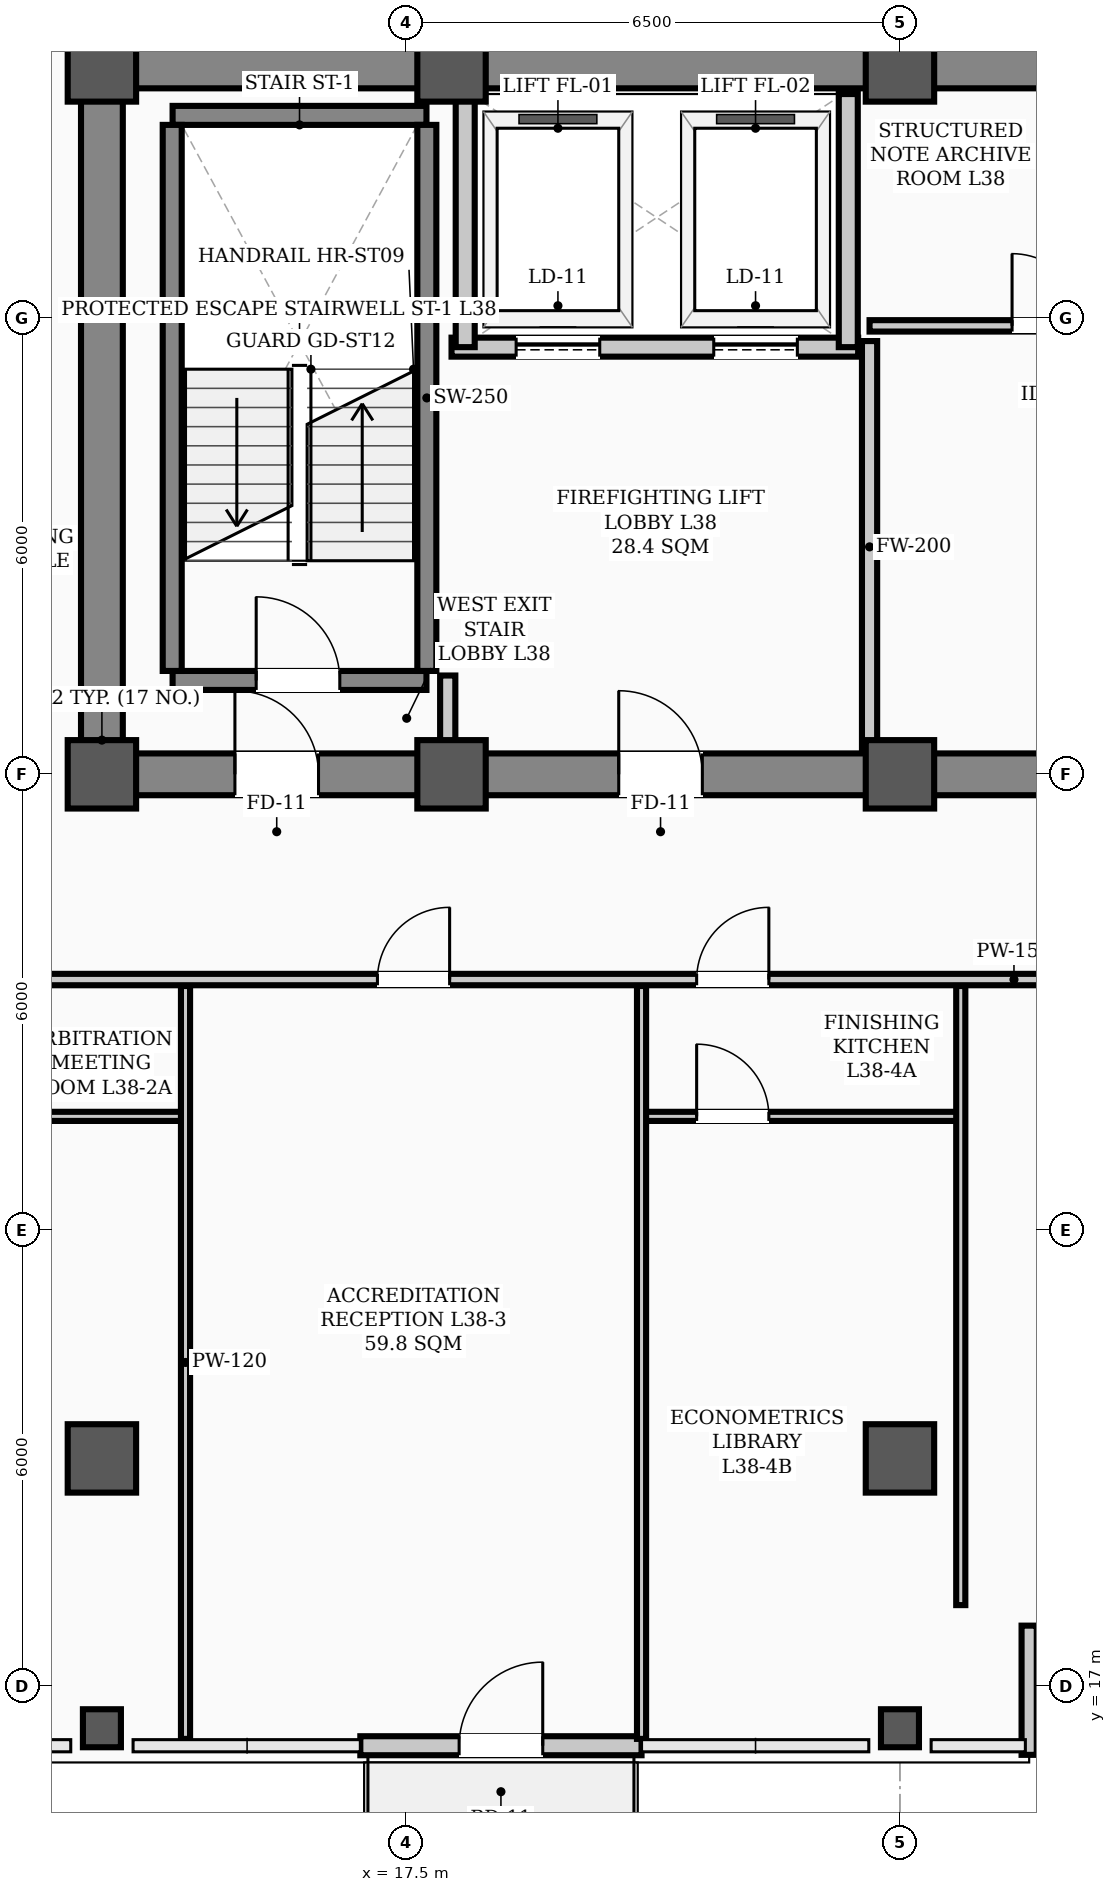
"""IFC4 building model, lengths in metres.
Left out: names, types, materials, properties, quantities, classifications, styles, units other than length and angle.
Written with IfcOpenShell. Run it as: python <this file> out.ifc"""

import sys

from ifc_helpers import new_model, si_unit, direction, frame, frame_2d, origin, origin_2d, place, context, subcontext, project, spatial, rectangle, hollow_rectangle, extrude, element, fill, save


model = new_model("IFC4")
c1 = context("Model", 3, precision=1e-05, world=origin(), true_north=direction((0.0, 1.0)))
c2 = subcontext(c1, "Body", "Model", "MODEL_VIEW")
j1 = project(units=[si_unit("LENGTHUNIT", "METRE"), si_unit("PLANEANGLEUNIT", "RADIAN")], contexts=[c1])
p1 = place(None, origin())
s1 = spatial("IfcSite", under=j1, at=p1, CompositionType="ELEMENT")
p2 = place(p1, origin())
s2 = spatial("IfcBuilding", under=s1, at=p2, CompositionType="ELEMENT")
p3 = place(p2, frame((0.0, 0.0, 153.9)))
s3 = spatial("IfcBuildingStorey", under=s2, at=p3, CompositionType="ELEMENT", Elevation=153.9)
for number, where, z_axis, x_axis in (
    (1, (13.5, 29.0, 0.0), (0.0, 0.0, 1.0), (1.0, 0.0, 0.0)),
    (2, (13.5, 38.3, 0.0), (0.0, 0.0, 1.0), (1.0, 0.0, 0.0)),
    (3, (18.1, 29.0, 0.0), (0.0, 0.0, 1.0), (1.0, 0.0, 0.0)),
    (4, (18.1, 38.3, 0.0), (0.0, 0.0, 1.0), (1.0, 0.0, 0.0)),
    (5, (24.0, 29.0, 0.0), (0.0, 0.0, 1.0), (1.0, 0.0, 0.0)),
    (6, (24.0, 38.3, 0.0), (0.0, 0.0, 1.0), (1.0, 0.0, 0.0)),
    (7, (13.5, 20.0, 0.0), (0.0, 0.0, 1.0), (1.0, 0.0, 0.0)),
    (8, (24.0, 20.0, 0.0), (0.0, 0.0, 1.0), (1.0, 0.0, 0.0)),
):
    element("IfcColumn", number, at=place(p3, frame(where, z_axis=z_axis, x_axis=x_axis)), inside=s3, PredefinedType="COLUMN", context=c2, shape_type="SweptSolid", body=[
        extrude(hollow_rectangle(XDim=0.9, YDim=0.9, WallThickness=0.035, InnerFilletRadius=0.017, OuterFilletRadius=0.052, at=origin_2d()), origin(), (0.0, 0.0, 1.0), 3.9),
    ])
for number, where, z_axis, x_axis in (
    (9, (13.5, 16.45, 0.0), (0.0, 0.0, 1.0), (1.0, 0.0, 0.0)),
    (10, (24.0, 16.45, 0.0), (0.0, 0.0, 1.0), (1.0, 0.0, 0.0)),
):
    element("IfcColumn", number, at=place(p3, frame(where, z_axis=z_axis, x_axis=x_axis)), inside=s3, PredefinedType="COLUMN", context=c2, shape_type="SweptSolid", body=[
        extrude(hollow_rectangle(XDim=0.5, YDim=0.5, WallThickness=0.024, InnerFilletRadius=0.012, OuterFilletRadius=0.036, at=origin_2d()), origin(), (0.0, 0.0, 1.0), 3.9),
    ])
p4 = place(p3, frame((25.7, 16.1, 0.0), z_axis=(0.0, 0.0, 1.0), x_axis=(0.0, 1.0, 0.0)))
e11 = element("IfcWall", 11, at=p4, inside=s3, PredefinedType="PARAPET", context=c2, shape_type="SweptSolid", body=[
    extrude(rectangle(XDim=1.7, YDim=0.2, at=frame_2d((0.85, 0.0))), origin(), (0.0, 0.0, 1.0), 1.2),
])
p5 = place(p3, frame((16.9, 16.22, 0.0), z_axis=(0.0, 0.0, 1.0), x_axis=(1.0, 0.0, 0.0)))
e12 = element("IfcWall", 12, at=p5, inside=s3, PredefinedType="STANDARD", context=c2, shape_type="SweptSolid", body=[
    extrude(rectangle(XDim=3.7, YDim=0.25, at=frame_2d((1.85, 0.0))), origin(), (0.0, 0.0, 1.0), 3.18),
])
p6 = place(p5, frame((1.3, 0.0, 0.0)))
e13 = element("IfcOpeningElement", 13, at=p6, cuts=e12, PredefinedType="OPENING", context=c2, shape_type="SweptSolid", body=[
    extrude(rectangle(XDim=1.1, YDim=2.2, at=frame_2d((0.55, 1.1))), frame((0.0, 0.135, 0.0), z_axis=(0.0, -1.0, 0.0), x_axis=(1.0, 0.0, 0.0)), (0.0, 0.0, 1.0), 0.27),
])
p7 = place(p3, frame((13.5, 29.0, 0.0), z_axis=(0.0, 0.0, 1.0), x_axis=(1.0, 0.0, 0.0)))
e14 = element("IfcWall", 14, at=p7, inside=s3, PredefinedType="SHEAR", context=c2, shape_type="SweptSolid", body=[
    extrude(rectangle(XDim=30.5, YDim=0.55, at=frame_2d((15.25, 0.0))), origin(), (0.0, 0.0, 1.0), 3.72),
])
p8 = place(p7, frame((1.75, 0.0, 0.0)))
e15 = element("IfcOpeningElement", 15, at=p8, cuts=e14, PredefinedType="OPENING", context=c2, shape_type="SweptSolid", body=[
    extrude(rectangle(XDim=1.1, YDim=2.08, at=frame_2d((0.55, 1.04))), frame((0.0, 0.285, 0.0), z_axis=(0.0, -1.0, 0.0), x_axis=(1.0, 0.0, 0.0)), (0.0, 0.0, 1.0), 0.57),
])
p9 = place(p7, frame((26.7, 0.0, 0.0)))
e16 = element("IfcOpeningElement", 16, at=p9, cuts=e14, PredefinedType="OPENING", context=c2, shape_type="SweptSolid", body=[
    extrude(rectangle(XDim=1.1, YDim=2.08, at=frame_2d((0.55, 1.04))), frame((0.0, 0.285, 0.0), z_axis=(0.0, -1.0, 0.0), x_axis=(1.0, 0.0, 0.0)), (0.0, 0.0, 1.0), 0.57),
])
p10 = place(p7, frame((6.8, 0.0, 0.0)))
e17 = element("IfcOpeningElement", 17, at=p10, cuts=e14, PredefinedType="OPENING", context=c2, shape_type="SweptSolid", body=[
    extrude(rectangle(XDim=1.1, YDim=2.08, at=frame_2d((0.55, 1.04))), frame((0.0, 0.285, 0.0), z_axis=(0.0, -1.0, 0.0), x_axis=(1.0, 0.0, 0.0)), (0.0, 0.0, 1.0), 0.57),
])
p11 = place(p7, frame((13.2, 0.0, 0.0)))
e18 = element("IfcOpeningElement", 18, at=p11, cuts=e14, PredefinedType="OPENING", context=c2, shape_type="SweptSolid", body=[
    extrude(rectangle(XDim=1.6, YDim=2.08, at=frame_2d((0.8, 1.04))), frame((0.0, 0.285, 0.0), z_axis=(0.0, -1.0, 0.0), x_axis=(1.0, 0.0, 0.0)), (0.0, 0.0, 1.0), 0.57),
])
p12 = place(p7, frame((20.525, 0.0, 0.0)))
e19 = element("IfcOpeningElement", 19, at=p12, cuts=e14, PredefinedType="OPENING", context=c2, shape_type="SweptSolid", body=[
    extrude(rectangle(XDim=0.95, YDim=2.08, at=frame_2d((0.475, 1.04))), frame((0.0, 0.285, 0.0), z_axis=(0.0, -1.0, 0.0), x_axis=(1.0, 0.0, 0.0)), (0.0, 0.0, 1.0), 0.57),
])
p13 = place(p3, frame((13.5, 38.3, 0.0), z_axis=(0.0, 0.0, 1.0), x_axis=(1.0, 0.0, 0.0)))
e20 = element("IfcWall", 20, at=p13, inside=s3, PredefinedType="SHEAR", context=c2, shape_type="SweptSolid", body=[
    extrude(rectangle(XDim=30.5, YDim=0.55, at=frame_2d((15.25, 0.0))), origin(), (0.0, 0.0, 1.0), 3.72),
])
p14 = place(p3, frame((13.5, 29.35, 0.0), z_axis=(0.0, 0.0, 1.0), x_axis=(0.0, 1.0, 0.0)))
e21 = element("IfcWall", 21, at=p14, inside=s3, PredefinedType="SHEAR", context=c2, shape_type="SweptSolid", body=[
    extrude(rectangle(XDim=8.6, YDim=0.55, at=frame_2d((4.3, 0.0))), origin(), (0.0, 0.0, 1.0), 3.72),
])
p15 = place(p3, frame((14.43, 30.235, 0.0), z_axis=(0.0, 0.0, 1.0), x_axis=(1.0, 0.0, 0.0)))
e22 = element("IfcWall", 22, at=p15, inside=s3, PredefinedType="STANDARD", context=c2, shape_type="SweptSolid", body=[
    extrude(rectangle(XDim=3.34, YDim=0.25, at=frame_2d((1.67, 0.0))), origin(), (0.0, 0.0, 1.0), 3.72),
])
p16 = place(p15, frame((1.1, 0.0, 0.0)))
e23 = element("IfcOpeningElement", 23, at=p16, cuts=e22, PredefinedType="OPENING", context=c2, shape_type="SweptSolid", body=[
    extrude(rectangle(XDim=1.1, YDim=2.08, at=frame_2d((0.55, 1.04))), frame((0.0, 0.135, 0.0), z_axis=(0.0, -1.0, 0.0), x_axis=(1.0, 0.0, 0.0)), (0.0, 0.0, 1.0), 0.27),
])
p17 = place(p3, frame((14.43, 37.669, 0.0), z_axis=(0.0, 0.0, 1.0), x_axis=(1.0, 0.0, 0.0)))
e24 = element("IfcWall", 24, at=p17, inside=s3, PredefinedType="STANDARD", context=c2, shape_type="SweptSolid", body=[
    extrude(rectangle(XDim=3.34, YDim=0.25, at=frame_2d((1.67, 0.0))), origin(), (0.0, 0.0, 1.0), 3.72),
])
for number, where, z_axis, x_axis in (
    (25, (14.425, 30.36, 0.0), (0.0, 0.0, 1.0), (0.0, 1.0, 0.0)),
    (26, (17.775, 30.36, 0.0), (0.0, 0.0, 1.0), (0.0, 1.0, 0.0)),
):
    element("IfcWall", number, at=place(p3, frame(where, z_axis=z_axis, x_axis=x_axis)), inside=s3, PredefinedType="STANDARD", context=c2, shape_type="SweptSolid", body=[
        extrude(rectangle(XDim=7.184, YDim=0.25, at=frame_2d((3.592, 0.0))), origin(), (0.0, 0.0, 1.0), 3.72),
    ])
p18 = place(p3, frame((18.1, 34.62, 0.0), z_axis=(0.0, 0.0, 1.0), x_axis=(1.0, 0.0, 0.0)))
e27 = element("IfcWall", 27, at=p18, inside=s3, PredefinedType="STANDARD", context=c2, shape_type="SweptSolid", body=[
    extrude(rectangle(XDim=5.35, YDim=0.25, at=frame_2d((2.675, 0.0))), origin(), (0.0, 0.0, 1.0), 3.72),
])
p19 = place(p18, frame((0.85, 0.0, 0.0)))
e28 = element("IfcOpeningElement", 28, at=p19, cuts=e27, PredefinedType="OPENING", context=c2, shape_type="SweptSolid", body=[
    extrude(rectangle(XDim=1.1, YDim=2.08, at=frame_2d((0.55, 1.04))), frame((0.0, 0.135, 0.0), z_axis=(0.0, -1.0, 0.0), x_axis=(1.0, 0.0, 0.0)), (0.0, 0.0, 1.0), 0.27),
])
p20 = place(p18, frame((3.45, 0.0, 0.0)))
e29 = element("IfcOpeningElement", 29, at=p20, cuts=e27, PredefinedType="OPENING", context=c2, shape_type="SweptSolid", body=[
    extrude(rectangle(XDim=1.1, YDim=2.08, at=frame_2d((0.55, 1.04))), frame((0.0, 0.135, 0.0), z_axis=(0.0, -1.0, 0.0), x_axis=(1.0, 0.0, 0.0)), (0.0, 0.0, 1.0), 0.27),
])
for number, where, z_axis, x_axis in (
    (30, (18.28, 34.62, 0.0), (0.0, 0.0, 1.0), (0.0, 1.0, 0.0)),
    (31, (23.32, 34.62, 0.0), (0.0, 0.0, 1.0), (0.0, 1.0, 0.0)),
):
    element("IfcWall", number, at=place(p3, frame(where, z_axis=z_axis, x_axis=x_axis)), inside=s3, PredefinedType="STANDARD", context=c2, shape_type="SweptSolid", body=[
        extrude(rectangle(XDim=3.33, YDim=0.25, at=frame_2d((1.665, 0.0))), origin(), (0.0, 0.0, 1.0), 3.35),
    ])
p21 = place(p3, frame((23.6, 34.9, 0.0), z_axis=(0.0, 0.0, 1.0), x_axis=(1.0, 0.0, 0.0)))
e32 = element("IfcWall", 32, at=p21, inside=s3, PredefinedType="PARTITIONING", context=c2, shape_type="SweptSolid", body=[
    extrude(rectangle(XDim=4.58, YDim=0.15, at=frame_2d((2.29, 0.0))), origin(), (0.0, 0.0, 1.0), 3.72),
])
p22 = place(p21, frame((1.875, 0.0, 0.0)))
e33 = element("IfcOpeningElement", 33, at=p22, cuts=e32, PredefinedType="OPENING", context=c2, shape_type="SweptSolid", body=[
    extrude(rectangle(XDim=0.95, YDim=2.08, at=frame_2d((0.475, 1.04))), frame((0.0, 0.085, 0.0), z_axis=(0.0, -1.0, 0.0), x_axis=(1.0, 0.0, 0.0)), (0.0, 0.0, 1.0), 0.17),
])
p23 = place(p3, frame((2.31, 26.3, 0.0), z_axis=(0.0, 0.0, 1.0), x_axis=(1.0, 0.0, 0.0)))
e34 = element("IfcWall", 34, at=p23, inside=s3, PredefinedType="PARTITIONING", context=c2, shape_type="SweptSolid", body=[
    extrude(rectangle(XDim=46.38, YDim=0.15, at=frame_2d((23.19, 0.0))), origin(), (0.0, 0.0, 1.0), 3.2),
])
p24 = place(p23, frame((9.19, 0.0, 0.0)))
e35 = element("IfcOpeningElement", 35, at=p24, cuts=e34, PredefinedType="OPENING", context=c2, shape_type="SweptSolid", body=[
    extrude(rectangle(XDim=0.95, YDim=2.08, at=frame_2d((0.475, 1.04))), frame((0.0, 0.085, 0.0), z_axis=(0.0, -1.0, 0.0), x_axis=(1.0, 0.0, 0.0)), (0.0, 0.0, 1.0), 0.17),
])
p25 = place(p23, frame((14.815, 0.0, 0.0)))
e36 = element("IfcOpeningElement", 36, at=p25, cuts=e34, PredefinedType="OPENING", context=c2, shape_type="SweptSolid", body=[
    extrude(rectangle(XDim=0.95, YDim=2.08, at=frame_2d((0.475, 1.04))), frame((0.0, 0.085, 0.0), z_axis=(0.0, -1.0, 0.0), x_axis=(1.0, 0.0, 0.0)), (0.0, 0.0, 1.0), 0.17),
])
p26 = place(p23, frame((19.015, 0.0, 0.0)))
e37 = element("IfcOpeningElement", 37, at=p26, cuts=e34, PredefinedType="OPENING", context=c2, shape_type="SweptSolid", body=[
    extrude(rectangle(XDim=0.95, YDim=2.08, at=frame_2d((0.475, 1.04))), frame((0.0, 0.085, 0.0), z_axis=(0.0, -1.0, 0.0), x_axis=(1.0, 0.0, 0.0)), (0.0, 0.0, 1.0), 0.17),
])
p27 = place(p23, frame((26.315, 0.0, 0.0)))
e38 = element("IfcOpeningElement", 38, at=p27, cuts=e34, PredefinedType="OPENING", context=c2, shape_type="SweptSolid", body=[
    extrude(rectangle(XDim=0.95, YDim=2.08, at=frame_2d((0.475, 1.04))), frame((0.0, 0.085, 0.0), z_axis=(0.0, -1.0, 0.0), x_axis=(1.0, 0.0, 0.0)), (0.0, 0.0, 1.0), 0.17),
])
p28 = place(p23, frame((32.915, 0.0, 0.0)))
e39 = element("IfcOpeningElement", 39, at=p28, cuts=e34, PredefinedType="OPENING", context=c2, shape_type="SweptSolid", body=[
    extrude(rectangle(XDim=0.95, YDim=2.08, at=frame_2d((0.475, 1.04))), frame((0.0, 0.085, 0.0), z_axis=(0.0, -1.0, 0.0), x_axis=(1.0, 0.0, 0.0)), (0.0, 0.0, 1.0), 0.17),
])
p29 = place(p23, frame((38.065, 0.0, 0.0)))
e40 = element("IfcOpeningElement", 40, at=p29, cuts=e34, PredefinedType="OPENING", context=c2, shape_type="SweptSolid", body=[
    extrude(rectangle(XDim=0.95, YDim=2.08, at=frame_2d((0.475, 1.04))), frame((0.0, 0.085, 0.0), z_axis=(0.0, -1.0, 0.0), x_axis=(1.0, 0.0, 0.0)), (0.0, 0.0, 1.0), 0.17),
])
p30 = place(p3, frame((8.8, 24.5, 0.0), z_axis=(0.0, 0.0, 1.0), x_axis=(1.0, 0.0, 0.0)))
e41 = element("IfcWall", 41, at=p30, inside=s3, PredefinedType="PARTITIONING", context=c2, shape_type="SweptSolid", body=[
    extrude(rectangle(XDim=5.8, YDim=0.12, at=frame_2d((2.9, 0.0))), origin(), (0.0, 0.0, 1.0), 3.2),
])
p31 = place(p30, frame((2.425, 0.0, 0.0)))
e42 = element("IfcOpeningElement", 42, at=p31, cuts=e41, PredefinedType="OPENING", context=c2, shape_type="SweptSolid", body=[
    extrude(rectangle(XDim=0.95, YDim=2.08, at=frame_2d((0.475, 1.04))), frame((0.0, 0.07, 0.0), z_axis=(0.0, -1.0, 0.0), x_axis=(1.0, 0.0, 0.0)), (0.0, 0.0, 1.0), 0.14),
])
p32 = place(p3, frame((20.6, 24.5, 0.0), z_axis=(0.0, 0.0, 1.0), x_axis=(1.0, 0.0, 0.0)))
e43 = element("IfcWall", 43, at=p32, inside=s3, PredefinedType="PARTITIONING", context=c2, shape_type="SweptSolid", body=[
    extrude(rectangle(XDim=4.2, YDim=0.12, at=frame_2d((2.1, 0.0))), origin(), (0.0, 0.0, 1.0), 3.2),
])
p33 = place(p32, frame((0.725, 0.0, 0.0)))
e44 = element("IfcOpeningElement", 44, at=p33, cuts=e43, PredefinedType="OPENING", context=c2, shape_type="SweptSolid", body=[
    extrude(rectangle(XDim=0.95, YDim=2.08, at=frame_2d((0.475, 1.04))), frame((0.0, 0.07, 0.0), z_axis=(0.0, -1.0, 0.0), x_axis=(1.0, 0.0, 0.0)), (0.0, 0.0, 1.0), 0.14),
])
p34 = place(p3, frame((18.05, 29.285, 0.0), z_axis=(0.0, 0.0, 1.0), x_axis=(0.0, 1.0, 0.0)))
e45 = element("IfcWall", 45, at=p34, inside=s3, PredefinedType="STANDARD", context=c2, shape_type="SweptSolid", body=[
    extrude(rectangle(XDim=1.015, YDim=0.2, at=frame_2d((0.508, 0.0))), origin(), (0.0, 0.0, 1.0), 3.35),
])
p35 = place(p3, frame((23.6, 29.285, 0.0), z_axis=(0.0, 0.0, 1.0), x_axis=(0.0, 1.0, 0.0)))
e46 = element("IfcWall", 46, at=p35, inside=s3, PredefinedType="STANDARD", context=c2, shape_type="SweptSolid", body=[
    extrude(rectangle(XDim=5.415, YDim=0.2, at=frame_2d((2.708, 0.0))), origin(), (0.0, 0.0, 1.0), 3.2),
])
for number, where, z_axis, x_axis in (
    (47, (14.6, 16.31, 0.0), (0.0, 0.0, 1.0), (0.0, 1.0, 0.0)),
    (48, (20.6, 16.31, 0.0), (0.0, 0.0, 1.0), (0.0, 1.0, 0.0)),
):
    element("IfcWall", number, at=place(p3, frame(where, z_axis=z_axis, x_axis=x_axis)), inside=s3, PredefinedType="PARTITIONING", context=c2, shape_type="SweptSolid", body=[
        extrude(rectangle(XDim=9.905, YDim=0.12, at=frame_2d((4.953, 0.0))), origin(), (0.0, 0.0, 1.0), 3.1),
    ])
p36 = place(p3, frame((24.8, 18.07, 0.0), z_axis=(0.0, 0.0, 1.0), x_axis=(0.0, 1.0, 0.0)))
e49 = element("IfcWall", 49, at=p36, inside=s3, PredefinedType="PARTITIONING", context=c2, shape_type="SweptSolid", body=[
    extrude(rectangle(XDim=8.145, YDim=0.12, at=frame_2d((4.073, 0.0))), origin(), (0.0, 0.0, 1.0), 3.1),
])
p37 = place(p6, origin())
e50 = element("IfcDoor", 50, at=p37, inside=s3, OperationType="SINGLE_SWING_RIGHT", PredefinedType="DOOR", context=c2, shape_type="SweptSolid", body=[
    extrude(rectangle(XDim=1.1, YDim=2.2, at=frame_2d((0.55, 1.1))), frame((0.0, 0.025, 0.0), z_axis=(0.0, -1.0, 0.0), x_axis=(1.0, 0.0, 0.0)), (0.0, 0.0, 1.0), 0.05),
])
fill(e13, e50)
p38 = place(p16, origin())
e51 = element("IfcDoor", 51, at=p38, inside=s3, OperationType="SINGLE_SWING_LEFT", PredefinedType="DOOR", context=c2, shape_type="SweptSolid", body=[
    extrude(rectangle(XDim=1.1, YDim=2.08, at=frame_2d((0.55, 1.04))), frame((0.0, 0.025, 0.0), z_axis=(0.0, -1.0, 0.0), x_axis=(1.0, 0.0, 0.0)), (0.0, 0.0, 1.0), 0.05),
])
fill(e23, e51)
p39 = place(p8, origin())
e52 = element("IfcDoor", 52, at=p39, inside=s3, OperationType="SINGLE_SWING_LEFT", PredefinedType="DOOR", context=c2, shape_type="SweptSolid", body=[
    extrude(rectangle(XDim=1.1, YDim=2.08, at=frame_2d((0.55, 1.04))), frame((0.0, 0.025, 0.0), z_axis=(0.0, -1.0, 0.0), x_axis=(1.0, 0.0, 0.0)), (0.0, 0.0, 1.0), 0.05),
])
fill(e15, e52)
p40 = place(p10, origin())
e53 = element("IfcDoor", 53, at=p40, inside=s3, OperationType="SINGLE_SWING_LEFT", PredefinedType="DOOR", context=c2, shape_type="SweptSolid", body=[
    extrude(rectangle(XDim=1.1, YDim=2.08, at=frame_2d((0.55, 1.04))), frame((0.0, 0.025, 0.0), z_axis=(0.0, -1.0, 0.0), x_axis=(1.0, 0.0, 0.0)), (0.0, 0.0, 1.0), 0.05),
])
fill(e17, e53)
p41 = place(p22, origin())
e54 = element("IfcDoor", 54, at=p41, inside=s3, OperationType="SINGLE_SWING_LEFT", PredefinedType="DOOR", context=c2, shape_type="SweptSolid", body=[
    extrude(rectangle(XDim=0.95, YDim=2.08, at=frame_2d((0.475, 1.04))), frame((0.0, 0.025, 0.0), z_axis=(0.0, -1.0, 0.0), x_axis=(1.0, 0.0, 0.0)), (0.0, 0.0, 1.0), 0.05),
])
fill(e33, e54)
p42 = place(p25, origin())
e55 = element("IfcDoor", 55, at=p42, inside=s3, OperationType="SINGLE_SWING_RIGHT", PredefinedType="DOOR", context=c2, shape_type="SweptSolid", body=[
    extrude(rectangle(XDim=0.95, YDim=2.08, at=frame_2d((0.475, 1.04))), frame((0.0, 0.025, 0.0), z_axis=(0.0, -1.0, 0.0), x_axis=(1.0, 0.0, 0.0)), (0.0, 0.0, 1.0), 0.05),
])
fill(e36, e55)
p43 = place(p33, origin())
e56 = element("IfcDoor", 56, at=p43, inside=s3, OperationType="SINGLE_SWING_LEFT", PredefinedType="DOOR", context=c2, shape_type="SweptSolid", body=[
    extrude(rectangle(XDim=0.95, YDim=2.08, at=frame_2d((0.475, 1.04))), frame((0.0, 0.025, 0.0), z_axis=(0.0, -1.0, 0.0), x_axis=(1.0, 0.0, 0.0)), (0.0, 0.0, 1.0), 0.05),
])
fill(e44, e56)
p44 = place(p26, origin())
e57 = element("IfcDoor", 57, at=p44, inside=s3, OperationType="SINGLE_SWING_RIGHT", PredefinedType="DOOR", context=c2, shape_type="SweptSolid", body=[
    extrude(rectangle(XDim=0.95, YDim=2.08, at=frame_2d((0.475, 1.04))), frame((0.0, 0.025, 0.0), z_axis=(0.0, -1.0, 0.0), x_axis=(1.0, 0.0, 0.0)), (0.0, 0.0, 1.0), 0.05),
])
fill(e37, e57)
p45 = place(p19, origin())
e58 = element("IfcDoor", 58, at=p45, inside=s3, OperationType="SLIDING_TO_LEFT", PredefinedType="DOOR", context=c2, shape_type="SweptSolid", body=[
    extrude(rectangle(XDim=1.1, YDim=2.08, at=frame_2d((0.55, 1.04))), frame((0.0, 0.025, 0.0), z_axis=(0.0, -1.0, 0.0), x_axis=(1.0, 0.0, 0.0)), (0.0, 0.0, 1.0), 0.05),
])
fill(e28, e58)
p46 = place(p20, origin())
e59 = element("IfcDoor", 59, at=p46, inside=s3, OperationType="SLIDING_TO_LEFT", PredefinedType="DOOR", context=c2, shape_type="SweptSolid", body=[
    extrude(rectangle(XDim=1.1, YDim=2.08, at=frame_2d((0.55, 1.04))), frame((0.0, 0.025, 0.0), z_axis=(0.0, -1.0, 0.0), x_axis=(1.0, 0.0, 0.0)), (0.0, 0.0, 1.0), 0.05),
])
fill(e29, e59)
save(model, sys.argv[1])
